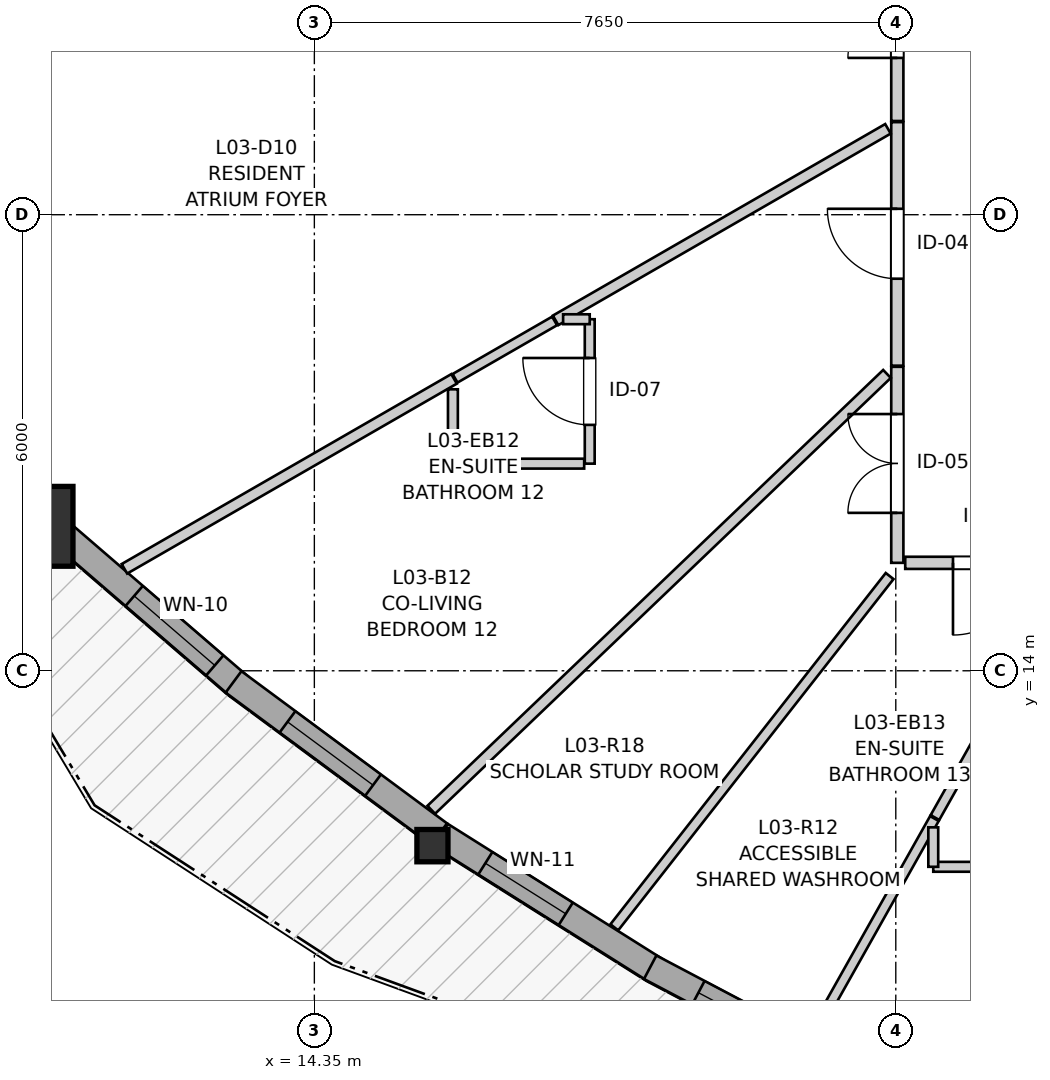
"""IFC4 building model, lengths in metres.
Left out: names, types, materials, properties, quantities, classifications, styles, units other than length and angle.
Written with IfcOpenShell. Run it as: python <this file> out.ifc"""

import sys

from ifc_helpers import new_model, si_unit, direction, frame, frame_2d, origin, origin_2d, place, context, subcontext, project, spatial, rectangle, i_section, extrude, source, transform, mapped, element, fill, save


model = new_model("IFC4")
c1 = context("Model", 3, precision=1e-05, world=origin(), true_north=direction((0.0, 1.0)))
c2 = subcontext(c1, "Body", "Model", "MODEL_VIEW")
j1 = project(units=[si_unit("LENGTHUNIT", "METRE"), si_unit("PLANEANGLEUNIT", "RADIAN")], contexts=[c1])
p1 = place(None, origin())
s1 = spatial("IfcSite", under=j1, at=p1, CompositionType="ELEMENT")
p2 = place(p1, origin())
s2 = spatial("IfcBuilding", under=s1, at=p2, CompositionType="ELEMENT")
p3 = place(p2, frame((0.0, 0.0, 14.2)))
s3 = spatial("IfcBuildingStorey", under=s2, at=p3, CompositionType="ELEMENT", Elevation=14.2)
m1 = source(origin(), c2, "Body", "SweptSolid", [
    extrude(rectangle(XDim=1.05, YDim=1.05, at=origin_2d()), origin(), (0.0, 0.0, 1.0), 2.94),
])
p4 = place(p3, frame((10.649, 15.9, 0.0), z_axis=(0.0, 0.0, 1.0), x_axis=(1.0, 0.0, 0.0)))
e1 = element("IfcColumn", 1, at=p4, inside=s3, PredefinedType="COLUMN", context=c2, shape_type="MappedRepresentation", body=[
    mapped(m1, transform((0.0, 0.0, 0.0), x_axis=(1.0, 0.0, 0.0), y_axis=(0.0, 1.0, 0.0), z_axis=(0.0, 0.0, 1.0), scale=1.0)),
])
m2 = source(origin(), c2, "Body", "SweptSolid", [
    extrude(i_section(OverallWidth=0.409, OverallDepth=0.425, WebThickness=0.03, FlangeThickness=0.048, FilletRadius=0.015, at=origin_2d()), origin(), (0.0, 0.0, 1.0), 2.94),
])
p5 = place(p3, frame((15.904, 11.699, 0.0), z_axis=(0.0, 0.0, 1.0), x_axis=(1.0, 0.0, 0.0)))
e2 = element("IfcColumn", 2, at=p5, inside=s3, PredefinedType="PILASTER", context=c2, shape_type="MappedRepresentation", body=[
    mapped(m2, transform((0.0, 0.0, 0.0), x_axis=(1.0, 0.0, 0.0), y_axis=(0.0, 1.0, 0.0), z_axis=(0.0, 0.0, 1.0), scale=1.0)),
])
p6 = place(p3, frame((10.99, 15.837, 0.0), z_axis=(0.0, 0.0, 1.0), x_axis=(0.757465946779, -0.652874673632, 0.0)))
e3 = element("IfcWall", 3, at=p6, inside=s3, PredefinedType="SOLIDWALL", context=c2, shape_type="SweptSolid", body=[
    extrude(rectangle(XDim=3.123, YDim=0.35, at=frame_2d((1.562, 0.0))), origin(), (0.0, 0.0, 1.0), 2.42),
])
p7 = place(p6, frame((1.305, 0.0, 0.82)))
e4 = element("IfcOpeningElement", 4, at=p7, cuts=e3, PredefinedType="OPENING", context=c2, shape_type="SweptSolid", body=[
    extrude(rectangle(XDim=1.4, YDim=1.35, at=frame_2d((0.7, 0.675))), frame((0.0, 0.185, 0.0), z_axis=(0.0, -1.0, 0.0), x_axis=(1.0, 0.0, 0.0)), (0.0, 0.0, 1.0), 0.37),
])
p8 = place(p3, frame((13.287, 13.854, 0.0), z_axis=(0.0, 0.0, 1.0), x_axis=(0.803848837202, -0.594833629622, 0.0)))
e5 = element("IfcWall", 5, at=p8, inside=s3, PredefinedType="SOLIDWALL", context=c2, shape_type="SweptSolid", body=[
    extrude(rectangle(XDim=3.365, YDim=0.35, at=frame_2d((1.683, 0.0))), origin(), (0.0, 0.0, 1.0), 2.42),
])
p9 = place(p8, frame((0.883, 0.0, 0.82)))
e6 = element("IfcOpeningElement", 6, at=p9, cuts=e5, PredefinedType="OPENING", context=c2, shape_type="SweptSolid", body=[
    extrude(rectangle(XDim=1.4, YDim=1.35, at=frame_2d((0.7, 0.675))), frame((0.0, 0.185, 0.0), z_axis=(0.0, -1.0, 0.0), x_axis=(1.0, 0.0, 0.0)), (0.0, 0.0, 1.0), 0.37),
])
p10 = place(p3, frame((16.014, 11.837, 0.0), z_axis=(0.0, 0.0, 1.0), x_axis=(0.846420438233, -0.532515203295, 0.0)))
e7 = element("IfcWall", 7, at=p10, inside=s3, PredefinedType="SOLIDWALL", context=c2, shape_type="SweptSolid", body=[
    extrude(rectangle(XDim=3.346, YDim=0.35, at=frame_2d((1.673, 0.0))), origin(), (0.0, 0.0, 1.0), 2.42),
])
p11 = place(p10, frame((0.692, 0.0, 0.82)))
e8 = element("IfcOpeningElement", 8, at=p11, cuts=e7, PredefinedType="OPENING", context=c2, shape_type="SweptSolid", body=[
    extrude(rectangle(XDim=1.25, YDim=1.35, at=frame_2d((0.625, 0.675))), frame((0.0, 0.185, 0.0), z_axis=(0.0, -1.0, 0.0), x_axis=(1.0, 0.0, 0.0)), (0.0, 0.0, 1.0), 0.37),
])
p12 = place(p3, frame((18.769, 10.1, 0.0), z_axis=(0.0, 0.0, 1.0), x_axis=(0.884401188265, -0.466727477438, 0.0)))
e9 = element("IfcWall", 9, at=p12, inside=s3, PredefinedType="SOLIDWALL", context=c2, shape_type="SweptSolid", body=[
    extrude(rectangle(XDim=3.066, YDim=0.35, at=frame_2d((1.533, 0.0))), origin(), (0.0, 0.0, 1.0), 2.42),
])
p13 = place(p12, frame((0.717, 0.0, 0.82)))
e10 = element("IfcOpeningElement", 10, at=p13, cuts=e9, PredefinedType="OPENING", context=c2, shape_type="SweptSolid", body=[
    extrude(rectangle(XDim=0.95, YDim=1.35, at=frame_2d((0.475, 0.675))), frame((0.0, 0.185, 0.0), z_axis=(0.0, -1.0, 0.0), x_axis=(1.0, 0.0, 0.0)), (0.0, 0.0, 1.0), 0.37),
])
p14 = place(p3, frame((22.02, 18.014, 0.0), z_axis=(0.0, 0.0, 1.0), x_axis=(0.0, 1.0, 0.0)))
e11 = element("IfcWall", 11, at=p14, inside=s3, PredefinedType="PARTITIONING", context=c2, shape_type="SweptSolid", body=[
    extrude(rectangle(XDim=3.204, YDim=0.16, at=frame_2d((1.602, 0.0))), origin(), (0.0, 0.0, 1.0), 2.94),
])
p15 = place(p14, frame((1.144, 0.0, 0.0)))
e12 = element("IfcOpeningElement", 12, at=p15, cuts=e11, PredefinedType="OPENING", context=c2, shape_type="SweptSolid", body=[
    extrude(rectangle(XDim=0.92, YDim=2.1, at=frame_2d((0.46, 1.05))), frame((0.0, 0.09, 0.0), z_axis=(0.0, -1.0, 0.0), x_axis=(1.0, 0.0, 0.0)), (0.0, 0.0, 1.0), 0.18),
])
p16 = place(p3, frame((22.02, 21.233, 0.0), z_axis=(0.0, 0.0, 1.0), x_axis=(0.0, 1.0, 0.0)))
e13 = element("IfcWall", 13, at=p16, inside=s3, PredefinedType="PARTITIONING", context=c2, shape_type="SweptSolid", body=[
    extrude(rectangle(XDim=2.917, YDim=0.16, at=frame_2d((1.458, 0.0))), origin(), (0.0, 0.0, 1.0), 2.94),
])
p17 = place(p16, frame((0.83, 0.0, 0.0)))
e14 = element("IfcOpeningElement", 14, at=p17, cuts=e13, PredefinedType="OPENING", context=c2, shape_type="SweptSolid", body=[
    extrude(rectangle(XDim=1.3, YDim=2.1, at=frame_2d((0.65, 1.05))), frame((0.0, 0.09, 0.0), z_axis=(0.0, -1.0, 0.0), x_axis=(1.0, 0.0, 0.0)), (0.0, 0.0, 1.0), 0.18),
])
p18 = place(p3, frame((22.02, 15.42, 0.0), z_axis=(0.0, 0.0, 1.0), x_axis=(0.0, 1.0, 0.0)))
e15 = element("IfcWall", 15, at=p18, inside=s3, PredefinedType="PARTITIONING", context=c2, shape_type="SweptSolid", body=[
    extrude(rectangle(XDim=2.579, YDim=0.16, at=frame_2d((1.29, 0.0))), origin(), (0.0, 0.0, 1.0), 2.94),
])
p19 = place(p18, frame((0.657, 0.0, 0.0)))
e16 = element("IfcOpeningElement", 16, at=p19, cuts=e15, PredefinedType="OPENING", context=c2, shape_type="SweptSolid", body=[
    extrude(rectangle(XDim=1.3, YDim=2.1, at=frame_2d((0.65, 1.05))), frame((0.0, 0.09, 0.0), z_axis=(0.0, -1.0, 0.0), x_axis=(1.0, 0.0, 0.0)), (0.0, 0.0, 1.0), 0.18),
])
p20 = place(p3, frame((24.368, 15.42, 0.0), z_axis=(0.0, 0.0, 1.0), x_axis=(-1.0, 0.0, 0.0)))
e17 = element("IfcWall", 17, at=p20, inside=s3, PredefinedType="PARTITIONING", context=c2, shape_type="SweptSolid", body=[
    extrude(rectangle(XDim=2.244, YDim=0.16, at=frame_2d((1.122, 0.0))), origin(), (0.0, 0.0, 1.0), 2.94),
])
p21 = place(p20, frame((0.666, 0.0, 0.0)))
e18 = element("IfcOpeningElement", 18, at=p21, cuts=e17, PredefinedType="OPENING", context=c2, shape_type="SweptSolid", body=[
    extrude(rectangle(XDim=0.95, YDim=2.1, at=frame_2d((0.475, 1.05))), frame((0.0, 0.09, 0.0), z_axis=(0.0, -1.0, 0.0), x_axis=(1.0, 0.0, 0.0)), (0.0, 0.0, 1.0), 0.18),
])
p22 = place(p3, frame((17.973, 16.725, 0.0), z_axis=(0.0, 0.0, 1.0), x_axis=(0.0, 1.0, 0.0)))
e19 = element("IfcWall", 19, at=p22, inside=s3, PredefinedType="PARTITIONING", context=c2, shape_type="SweptSolid", body=[
    extrude(rectangle(XDim=1.9, YDim=0.13, at=frame_2d((0.95, 0.0))), origin(), (0.0, 0.0, 1.0), 2.94),
])
p23 = place(p22, frame((0.51, 0.0, 0.0)))
e20 = element("IfcOpeningElement", 20, at=p23, cuts=e19, PredefinedType="OPENING", context=c2, shape_type="SweptSolid", body=[
    extrude(rectangle(XDim=0.88, YDim=2.05, at=frame_2d((0.44, 1.025))), frame((0.0, 0.075, 0.0), z_axis=(0.0, -1.0, 0.0), x_axis=(1.0, 0.0, 0.0)), (0.0, 0.0, 1.0), 0.15),
])
p24 = place(p3, frame((15.888, 12.171, 0.0), z_axis=(0.0, 0.0, 1.0), x_axis=(0.722733244608, 0.691127091886, 0.0)))
e21 = element("IfcWall", 21, at=p24, inside=s3, PredefinedType="PARTITIONING", context=c2, shape_type="SweptSolid", body=[
    extrude(rectangle(XDim=8.296, YDim=0.145, at=frame_2d((4.148, 0.0))), origin(), (0.0, 0.0, 1.0), 2.94),
])
p25 = place(p3, frame((18.296, 10.625, 0.0), z_axis=(0.0, 0.0, 1.0), x_axis=(0.616906721473, 0.787036274261, 0.0)))
e22 = element("IfcWall", 22, at=p25, inside=s3, PredefinedType="PARTITIONING", context=c2, shape_type="SweptSolid", body=[
    extrude(rectangle(XDim=5.872, YDim=0.13, at=frame_2d((2.936, 0.0))), origin(), (0.0, 0.0, 1.0), 2.94),
])
p26 = place(p3, frame((17.524, 18.61, 0.0), z_axis=(0.0, 0.0, 1.0), x_axis=(0.866454437228, 0.499256154903, 0.0)))
e23 = element("IfcWall", 23, at=p26, inside=s3, PredefinedType="PARTITIONING", context=c2, shape_type="SweptSolid", body=[
    extrude(rectangle(XDim=5.047, YDim=0.145, at=frame_2d((2.523, 0.0))), origin(), (0.0, 0.0, 1.0), 2.94),
])
p27 = place(p3, frame((11.851, 15.342, 0.0), z_axis=(0.0, 0.0, 1.0), x_axis=(0.86649075999, 0.499193111784, 0.0)))
e24 = element("IfcWall", 24, at=p27, inside=s3, PredefinedType="PARTITIONING", context=c2, shape_type="SweptSolid", body=[
    extrude(rectangle(XDim=5.005, YDim=0.145, at=frame_2d((2.502, 0.0))), origin(), (0.0, 0.0, 1.0), 2.94),
])
p28 = place(p3, frame((20.894, 9.187, 0.0), z_axis=(0.0, 0.0, 1.0), x_axis=(0.490433761368, 0.871478471169, 0.0)))
e25 = element("IfcWall", 25, at=p28, inside=s3, PredefinedType="PARTITIONING", context=c2, shape_type="SweptSolid", body=[
    extrude(rectangle(XDim=3.292, YDim=0.13, at=frame_2d((1.646, 0.0))), origin(), (0.0, 0.0, 1.0), 2.94),
])
p29 = place(p3, frame((16.173, 16.725, 0.0), z_axis=(0.0, 0.0, 1.0), x_axis=(1.0, 0.0, 0.0)))
e26 = element("IfcWall", 26, at=p29, inside=s3, PredefinedType="PARTITIONING", context=c2, shape_type="SweptSolid", body=[
    extrude(rectangle(XDim=1.727, YDim=0.13, at=frame_2d((0.863, 0.0))), origin(), (0.0, 0.0, 1.0), 2.94),
])
p30 = place(p3, frame((22.493, 11.421, 0.0), z_axis=(0.0, 0.0, 1.0), x_axis=(1.0, 0.0, 0.0)))
e27 = element("IfcWall", 27, at=p30, inside=s3, PredefinedType="PARTITIONING", context=c2, shape_type="SweptSolid", body=[
    extrude(rectangle(XDim=1.727, YDim=0.13, at=frame_2d((0.864, 0.0))), origin(), (0.0, 0.0, 1.0), 2.508),
])
p31 = place(p3, frame((16.201, 17.848, 0.0), z_axis=(0.0, 0.0, 1.0), x_axis=(0.866448907576, 0.49926575144, 0.0)))
e28 = element("IfcWall", 28, at=p31, inside=s3, PredefinedType="PARTITIONING", context=c2, shape_type="SweptSolid", body=[
    extrude(rectangle(XDim=1.512, YDim=0.13, at=frame_2d((0.756, 0.0))), origin(), (0.0, 0.0, 1.0), 2.94),
])
p32 = place(p3, frame((22.515, 12.069, 0.0), z_axis=(0.0, 0.0, 1.0), x_axis=(0.490286002917, 0.871561607314, 0.0)))
e29 = element("IfcWall", 29, at=p32, inside=s3, PredefinedType="PARTITIONING", context=c2, shape_type="SweptSolid", body=[
    extrude(rectangle(XDim=1.404, YDim=0.13, at=frame_2d((0.702, 0.0))), origin(), (0.0, 0.0, 1.0), 2.94),
])
p33 = place(p3, frame((16.173, 16.798, 0.0), z_axis=(0.0, 0.0, 1.0), x_axis=(0.0, 1.0, 0.0)))
e30 = element("IfcWall", 30, at=p33, inside=s3, PredefinedType="PARTITIONING", context=c2, shape_type="SweptSolid", body=[
    extrude(rectangle(XDim=0.905, YDim=0.13, at=frame_2d((0.452, 0.0))), origin(), (0.0, 0.0, 1.0), 2.94),
])
p34 = place(p3, frame((22.493, 11.421, 0.0), z_axis=(0.0, 0.0, 1.0), x_axis=(0.0, 1.0, 0.0)))
e31 = element("IfcWall", 31, at=p34, inside=s3, PredefinedType="PARTITIONING", context=c2, shape_type="SweptSolid", body=[
    extrude(rectangle(XDim=0.519, YDim=0.13, at=frame_2d((0.26, 0.0))), origin(), (0.0, 0.0, 1.0), 2.94),
])
p35 = place(p3, frame((17.623, 18.625, 0.0), z_axis=(0.0, 0.0, 1.0), x_axis=(1.0, 0.0, 0.0)))
e32 = element("IfcWall", 32, at=p35, inside=s3, PredefinedType="PARTITIONING", context=c2, shape_type="SweptSolid", body=[
    extrude(rectangle(XDim=0.35, YDim=0.13, at=frame_2d((0.175, 0.0))), origin(), (0.0, 0.0, 1.0), 2.94),
])
m3 = source(origin(), c2, "Body", "SweptSolid", [
    extrude(rectangle(XDim=1.4, YDim=1.35, at=frame_2d((0.7, 0.675))), frame((0.0, 0.03, 0.0), z_axis=(0.0, -1.0, 0.0), x_axis=(1.0, 0.0, 0.0)), (0.0, 0.0, 1.0), 0.06),
])
p36 = place(p7, origin())
e33 = element("IfcWindow", 33, at=p36, inside=s3, PartitioningType="SINGLE_PANEL", PredefinedType="WINDOW", context=c2, shape_type="MappedRepresentation", body=[
    mapped(m3, transform((0.0, 0.0, 0.0), x_axis=(1.0, 0.0, 0.0), y_axis=(0.0, 1.0, 0.0), z_axis=(0.0, 0.0, 1.0), scale=1.0)),
])
fill(e4, e33)
p37 = place(p9, origin())
e34 = element("IfcWindow", 34, at=p37, inside=s3, PartitioningType="SINGLE_PANEL", PredefinedType="WINDOW", context=c2, shape_type="MappedRepresentation", body=[
    mapped(m3, transform((0.0, 0.0, 0.0), x_axis=(1.0, 0.0, 0.0), y_axis=(0.0, 1.0, 0.0), z_axis=(0.0, 0.0, 1.0), scale=1.0)),
])
fill(e6, e34)
m4 = source(origin(), c2, "Body", "SweptSolid", [
    extrude(rectangle(XDim=1.25, YDim=1.35, at=frame_2d((0.625, 0.675))), frame((0.0, 0.03, 0.0), z_axis=(0.0, -1.0, 0.0), x_axis=(1.0, 0.0, 0.0)), (0.0, 0.0, 1.0), 0.06),
])
p38 = place(p11, origin())
e35 = element("IfcWindow", 35, at=p38, inside=s3, PartitioningType="SINGLE_PANEL", PredefinedType="WINDOW", context=c2, shape_type="MappedRepresentation", body=[
    mapped(m4, transform((0.0, 0.0, 0.0), x_axis=(1.0, 0.0, 0.0), y_axis=(0.0, 1.0, 0.0), z_axis=(0.0, 0.0, 1.0), scale=1.0)),
])
fill(e8, e35)
m5 = source(origin(), c2, "Body", "SweptSolid", [
    extrude(rectangle(XDim=0.95, YDim=1.35, at=frame_2d((0.475, 0.675))), frame((0.0, 0.03, 0.0), z_axis=(0.0, -1.0, 0.0), x_axis=(1.0, 0.0, 0.0)), (0.0, 0.0, 1.0), 0.06),
])
p39 = place(p13, origin())
e36 = element("IfcWindow", 36, at=p39, inside=s3, PartitioningType="SINGLE_PANEL", PredefinedType="WINDOW", context=c2, shape_type="MappedRepresentation", body=[
    mapped(m5, transform((0.0, 0.0, 0.0), x_axis=(1.0, 0.0, 0.0), y_axis=(0.0, 1.0, 0.0), z_axis=(0.0, 0.0, 1.0), scale=1.0)),
])
fill(e10, e36)
m6 = source(origin(), c2, "Body", "SweptSolid", [
    extrude(rectangle(XDim=0.92, YDim=2.1, at=frame_2d((0.46, 1.05))), frame((0.0, 0.025, 0.0), z_axis=(0.0, -1.0, 0.0), x_axis=(1.0, 0.0, 0.0)), (0.0, 0.0, 1.0), 0.05),
])
p40 = place(p15, origin())
e37 = element("IfcDoor", 37, at=p40, inside=s3, OperationType="SINGLE_SWING_RIGHT", PredefinedType="DOOR", context=c2, shape_type="MappedRepresentation", body=[
    mapped(m6, transform((0.0, 0.0, 0.0), x_axis=(1.0, 0.0, 0.0), y_axis=(0.0, 1.0, 0.0), z_axis=(0.0, 0.0, 1.0), scale=1.0)),
])
fill(e12, e37)
m7 = source(origin(), c2, "Body", "SweptSolid", [
    extrude(rectangle(XDim=1.3, YDim=2.1, at=frame_2d((0.65, 1.05))), frame((0.0, 0.025, 0.0), z_axis=(0.0, -1.0, 0.0), x_axis=(1.0, 0.0, 0.0)), (0.0, 0.0, 1.0), 0.05),
])
p41 = place(p17, origin())
e38 = element("IfcDoor", 38, at=p41, inside=s3, OperationType="DOUBLE_DOOR_SINGLE_SWING", PredefinedType="DOOR", context=c2, shape_type="MappedRepresentation", body=[
    mapped(m7, transform((0.0, 0.0, 0.0), x_axis=(1.0, 0.0, 0.0), y_axis=(0.0, 1.0, 0.0), z_axis=(0.0, 0.0, 1.0), scale=1.0)),
])
fill(e14, e38)
p42 = place(p19, origin())
e39 = element("IfcDoor", 39, at=p42, inside=s3, OperationType="DOUBLE_DOOR_SINGLE_SWING", PredefinedType="DOOR", context=c2, shape_type="MappedRepresentation", body=[
    mapped(m7, transform((0.0, 0.0, 0.0), x_axis=(1.0, 0.0, 0.0), y_axis=(0.0, 1.0, 0.0), z_axis=(0.0, 0.0, 1.0), scale=1.0)),
])
fill(e16, e39)
m8 = source(origin(), c2, "Body", "SweptSolid", [
    extrude(rectangle(XDim=0.95, YDim=2.1, at=frame_2d((0.475, 1.05))), frame((0.0, 0.025, 0.0), z_axis=(0.0, -1.0, 0.0), x_axis=(1.0, 0.0, 0.0)), (0.0, 0.0, 1.0), 0.05),
])
p43 = place(p21, origin())
e40 = element("IfcDoor", 40, at=p43, inside=s3, OperationType="SINGLE_SWING_RIGHT", PredefinedType="DOOR", context=c2, shape_type="MappedRepresentation", body=[
    mapped(m8, transform((0.0, 0.0, 0.0), x_axis=(1.0, 0.0, 0.0), y_axis=(0.0, 1.0, 0.0), z_axis=(0.0, 0.0, 1.0), scale=1.0)),
])
fill(e18, e40)
m9 = source(origin(), c2, "Body", "SweptSolid", [
    extrude(rectangle(XDim=0.88, YDim=2.05, at=frame_2d((0.44, 1.025))), frame((0.0, 0.025, 0.0), z_axis=(0.0, -1.0, 0.0), x_axis=(1.0, 0.0, 0.0)), (0.0, 0.0, 1.0), 0.05),
])
p44 = place(p23, origin())
e41 = element("IfcDoor", 41, at=p44, inside=s3, OperationType="SINGLE_SWING_RIGHT", PredefinedType="DOOR", context=c2, shape_type="MappedRepresentation", body=[
    mapped(m9, transform((0.0, 0.0, 0.0), x_axis=(1.0, 0.0, 0.0), y_axis=(0.0, 1.0, 0.0), z_axis=(0.0, 0.0, 1.0), scale=1.0)),
])
fill(e20, e41)
save(model, sys.argv[1])
